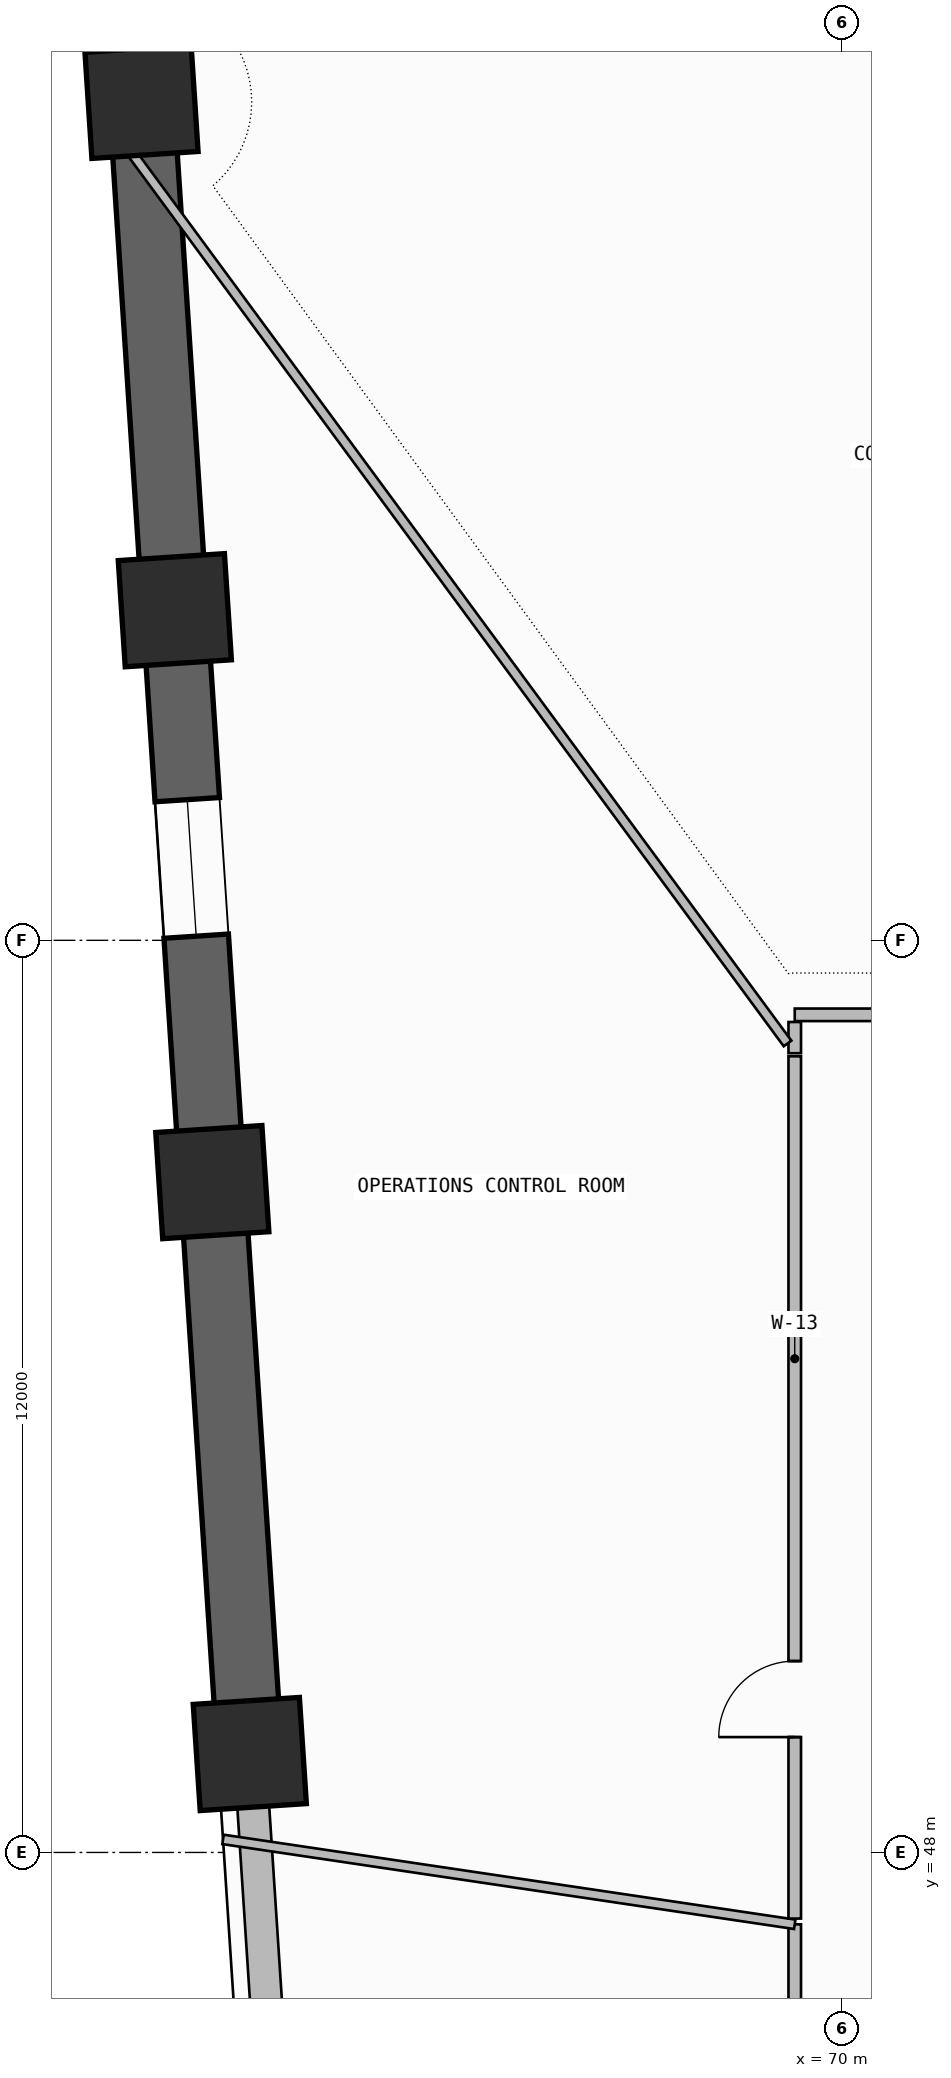
"""IFC4 building model, lengths in metres.
Left out: names, types, materials, properties, quantities, classifications, styles, units other than length and angle.
Written with IfcOpenShell. Run it as: python <this file> out.ifc"""

import sys

from ifc_helpers import new_model, si_unit, direction, frame, frame_2d, origin, origin_2d, place, context, subcontext, project, spatial, rectangle, extrude, element, fill, save


model = new_model("IFC4")
c1 = context("Model", 3, precision=1e-05, world=origin(), true_north=direction((0.0, 1.0)))
c2 = subcontext(c1, "Body", "Model", "MODEL_VIEW")
j1 = project(units=[si_unit("LENGTHUNIT", "METRE"), si_unit("PLANEANGLEUNIT", "RADIAN")], contexts=[c1])
p1 = place(None, origin())
s1 = spatial("IfcSite", under=j1, at=p1, CompositionType="ELEMENT")
p2 = place(p1, origin())
s2 = spatial("IfcBuilding", under=s1, at=p2, CompositionType="ELEMENT")
p3 = place(p2, frame((0.0, 0.0, 88.5)))
s3 = spatial("IfcBuildingStorey", under=s2, at=p3, CompositionType="ELEMENT", Elevation=88.5)
for number, where, z_axis, x_axis in (
    (1, (60.785, 71.031, 0.0), (0.0, 0.0, 1.0), (-0.065, 0.998, 0.0)),
    (2, (61.224, 64.343, 0.0), (0.0, 0.0, 1.0), (-0.065, 0.998, 0.0)),
    (3, (61.717, 56.819, 0.0), (0.0, 0.0, 1.0), (-0.065, 0.998, 0.0)),
    (4, (62.21, 49.295, 0.0), (0.0, 0.0, 1.0), (-0.065, 0.998, 0.0)),
):
    element("IfcColumn", number, at=place(p3, frame(where, z_axis=z_axis, x_axis=x_axis)), inside=s3, PredefinedType="COLUMN", context=c2, shape_type="SweptSolid", body=[
        extrude(rectangle(XDim=1.4, YDim=1.4, at=origin_2d()), origin(), (0.0, 0.0, 1.0), 3.6),
    ])
p4 = place(p3, frame((60.402, 76.883, 0.0), z_axis=(0.0, 0.0, 1.0), x_axis=(0.065402662459, -0.997858953832, 0.0)))
e5 = element("IfcWall", 5, at=p4, inside=s3, PredefinedType="SOLIDWALL", context=c2, shape_type="SweptSolid", body=[
    extrude(rectangle(XDim=5.864, YDim=0.42, at=frame_2d((2.932, 0.0))), origin(), (0.0, 0.0, 1.0), 2.725),
])
p5 = place(p4, frame((1.171, 0.0, 1.2)))
e6 = element("IfcOpeningElement", 6, at=p5, cuts=e5, PredefinedType="OPENING", context=c2, shape_type="SweptSolid", body=[
    extrude(rectangle(XDim=1.8, YDim=0.9, at=frame_2d((0.9, 0.45))), frame((0.0, 0.22, 0.0), z_axis=(0.0, -1.0, 0.0), x_axis=(1.0, 0.0, 0.0)), (0.0, 0.0, 1.0), 0.44),
])
p6 = place(p3, frame((60.785, 71.031, -0.26), z_axis=(0.0, 0.0, 1.0), x_axis=(0.065409824833, -0.997858484363, 0.0)))
e7 = element("IfcWall", 7, at=p6, inside=s3, PredefinedType="SHEAR", context=c2, shape_type="SweptSolid", body=[
    extrude(rectangle(XDim=21.783, YDim=0.85, at=frame_2d((10.891, 0.0))), origin(), (0.0, 0.0, 1.0), 3.6),
])
p7 = place(p6, frame((9.2, 0.0, 1.2)))
e8 = element("IfcOpeningElement", 8, at=p7, cuts=e7, PredefinedType="OPENING", context=c2, shape_type="SweptSolid", body=[
    extrude(rectangle(XDim=1.8, YDim=0.9, at=frame_2d((0.9, 0.45))), frame((0.0, 0.435, 0.0), z_axis=(0.0, -1.0, 0.0), x_axis=(1.0, 0.0, 0.0)), (0.0, 0.0, 1.0), 0.87),
])
p8 = place(p3, frame((62.21, 49.295, 0.0), z_axis=(0.0, 0.0, 1.0), x_axis=(0.065396027757, -0.997859388668, 0.0)))
e9 = element("IfcWall", 9, at=p8, inside=s3, PredefinedType="SOLIDWALL", context=c2, shape_type="SweptSolid", body=[
    extrude(rectangle(XDim=14.242, YDim=0.42, at=frame_2d((7.121, 0.0))), origin(), (0.0, 0.0, 1.0), 2.325),
])
p9 = place(p8, frame((5.7, 0.0, 1.2)))
e10 = element("IfcOpeningElement", 10, at=p9, cuts=e9, PredefinedType="OPENING", context=c2, shape_type="SweptSolid", body=[
    extrude(rectangle(XDim=1.8, YDim=0.9, at=frame_2d((0.9, 0.45))), frame((0.0, 0.22, 0.0), z_axis=(0.0, -1.0, 0.0), x_axis=(1.0, 0.0, 0.0)), (0.0, 0.0, 1.0), 0.44),
])
p10 = place(p3, frame((84.682, 65.372, 0.0), z_axis=(0.0, 0.0, 1.0), x_axis=(-0.842418773655, 0.538823356763, 0.0)))
e11 = element("IfcWall", 11, at=p10, inside=s3, PredefinedType="PARAPET", context=c2, shape_type="SweptSolid", body=[
    extrude(rectangle(XDim=19.612, YDim=0.2, at=frame_2d((9.806, 0.0))), origin(), (0.0, 0.0, 1.0), 1.15),
])
p11 = place(p3, frame((69.38, 47.055, 0.0), z_axis=(0.0, 0.0, 1.0), x_axis=(0.0, -1.0, 0.0)))
e12 = element("IfcWall", 12, at=p11, inside=s3, PredefinedType="PARTITIONING", context=c2, shape_type="SweptSolid", body=[
    extrude(rectangle(XDim=4.148, YDim=0.165, at=frame_2d((2.074, 0.0))), origin(), (0.0, 0.0, 1.0), 3.34),
])
p12 = place(p11, frame((1.574, 0.0, 0.0)))
e13 = element("IfcOpeningElement", 13, at=p12, cuts=e12, PredefinedType="OPENING", context=c2, shape_type="SweptSolid", body=[
    extrude(rectangle(XDim=1.0, YDim=2.2, at=frame_2d((0.5, 1.1))), frame((0.0, 0.093, 0.0), z_axis=(0.0, -1.0, 0.0), x_axis=(1.0, 0.0, 0.0)), (0.0, 0.0, 1.0), 0.185),
])
p13 = place(p3, frame((61.858, 48.172, 0.0), z_axis=(0.0, 0.0, 1.0), x_axis=(0.989154279696, -0.146880260617, 0.0)))
e14 = element("IfcWall", 14, at=p13, inside=s3, PredefinedType="PARTITIONING", context=c2, shape_type="SweptSolid", body=[
    extrude(rectangle(XDim=7.604, YDim=0.125, at=frame_2d((3.802, 0.0))), origin(), (0.0, 0.0, 1.0), 3.34),
])
p14 = place(p3, frame((80.877, 59.02, 0.0), z_axis=(0.0, 0.0, 1.0), x_axis=(-1.0, 0.0, 0.0)))
e15 = element("IfcWall", 15, at=p14, inside=s3, PredefinedType="PARTITIONING", context=c2, shape_type="SweptSolid", body=[
    extrude(rectangle(XDim=11.498, YDim=0.165, at=frame_2d((5.749, 0.0))), origin(), (0.0, 0.0, 1.0), 2.725),
])
p15 = place(p14, frame((5.249, 0.0, 0.0)))
e16 = element("IfcOpeningElement", 16, at=p15, cuts=e15, PredefinedType="OPENING", context=c2, shape_type="SweptSolid", body=[
    extrude(rectangle(XDim=1.0, YDim=2.2, at=frame_2d((0.5, 1.1))), frame((0.0, 0.093, 0.0), z_axis=(0.0, -1.0, 0.0), x_axis=(1.0, 0.0, 0.0)), (0.0, 0.0, 1.0), 0.185),
])
p16 = place(p3, frame((69.38, 58.926, 0.0), z_axis=(0.0, 0.0, 1.0), x_axis=(0.0, -1.0, 0.0)))
e17 = element("IfcWall", 17, at=p16, inside=s3, PredefinedType="PARTITIONING", context=c2, shape_type="SweptSolid", body=[
    extrude(rectangle(XDim=0.411, YDim=0.165, at=frame_2d((0.206, 0.0))), origin(), (0.0, 0.0, 1.0), 2.725),
])
p17 = place(p3, frame((69.285, 58.643, 0.0), z_axis=(0.0, 0.0, 1.0), x_axis=(-0.59305096897, 0.805164919879, 0.0)))
e18 = element("IfcWall", 18, at=p17, inside=s3, PredefinedType="PARTITIONING", context=c2, shape_type="SweptSolid", body=[
    extrude(rectangle(XDim=15.018, YDim=0.125, at=frame_2d((7.509, 0.0))), origin(), (0.0, 0.0, 1.0), 2.725),
])
p18 = place(p3, frame((69.38, 58.474, 0.0), z_axis=(0.0, 0.0, 1.0), x_axis=(0.0, -1.0, 0.0)))
e19 = element("IfcWall", 19, at=p18, inside=s3, PredefinedType="PARTITIONING", context=c2, shape_type="SweptSolid", body=[
    extrude(rectangle(XDim=11.344, YDim=0.165, at=frame_2d((5.672, 0.0))), origin(), (0.0, 0.0, 1.0), 2.725),
])
p19 = place(p18, frame((7.957, 0.0, 0.0)))
e20 = element("IfcOpeningElement", 20, at=p19, cuts=e19, PredefinedType="OPENING", context=c2, shape_type="SweptSolid", body=[
    extrude(rectangle(XDim=1.0, YDim=2.2, at=frame_2d((0.5, 1.1))), frame((0.0, 0.093, 0.0), z_axis=(0.0, -1.0, 0.0), x_axis=(1.0, 0.0, 0.0)), (0.0, 0.0, 1.0), 0.185),
])
p20 = place(p7, origin())
e21 = element("IfcWindow", 21, at=p20, inside=s3, PartitioningType="SINGLE_PANEL", PredefinedType="WINDOW", context=c2, shape_type="SweptSolid", body=[
    extrude(rectangle(XDim=1.8, YDim=0.9, at=frame_2d((0.9, 0.45))), frame((0.0, 0.03, 0.0), z_axis=(0.0, -1.0, 0.0), x_axis=(1.0, 0.0, 0.0)), (0.0, 0.0, 1.0), 0.06),
])
fill(e8, e21)
p21 = place(p19, frame((1.0, 0.0, 0.0), z_axis=(0.0, 0.0, 1.0), x_axis=(-1.0, 0.0, 0.0)))
e22 = element("IfcDoor", 22, at=p21, inside=s3, OperationType="SINGLE_SWING_LEFT", PredefinedType="DOOR", context=c2, shape_type="SweptSolid", body=[
    extrude(rectangle(XDim=1.0, YDim=2.2, at=frame_2d((0.5, 1.1))), frame((0.0, 0.025, 0.0), z_axis=(0.0, -1.0, 0.0), x_axis=(1.0, 0.0, 0.0)), (0.0, 0.0, 1.0), 0.05),
])
fill(e20, e22)
save(model, sys.argv[1])
